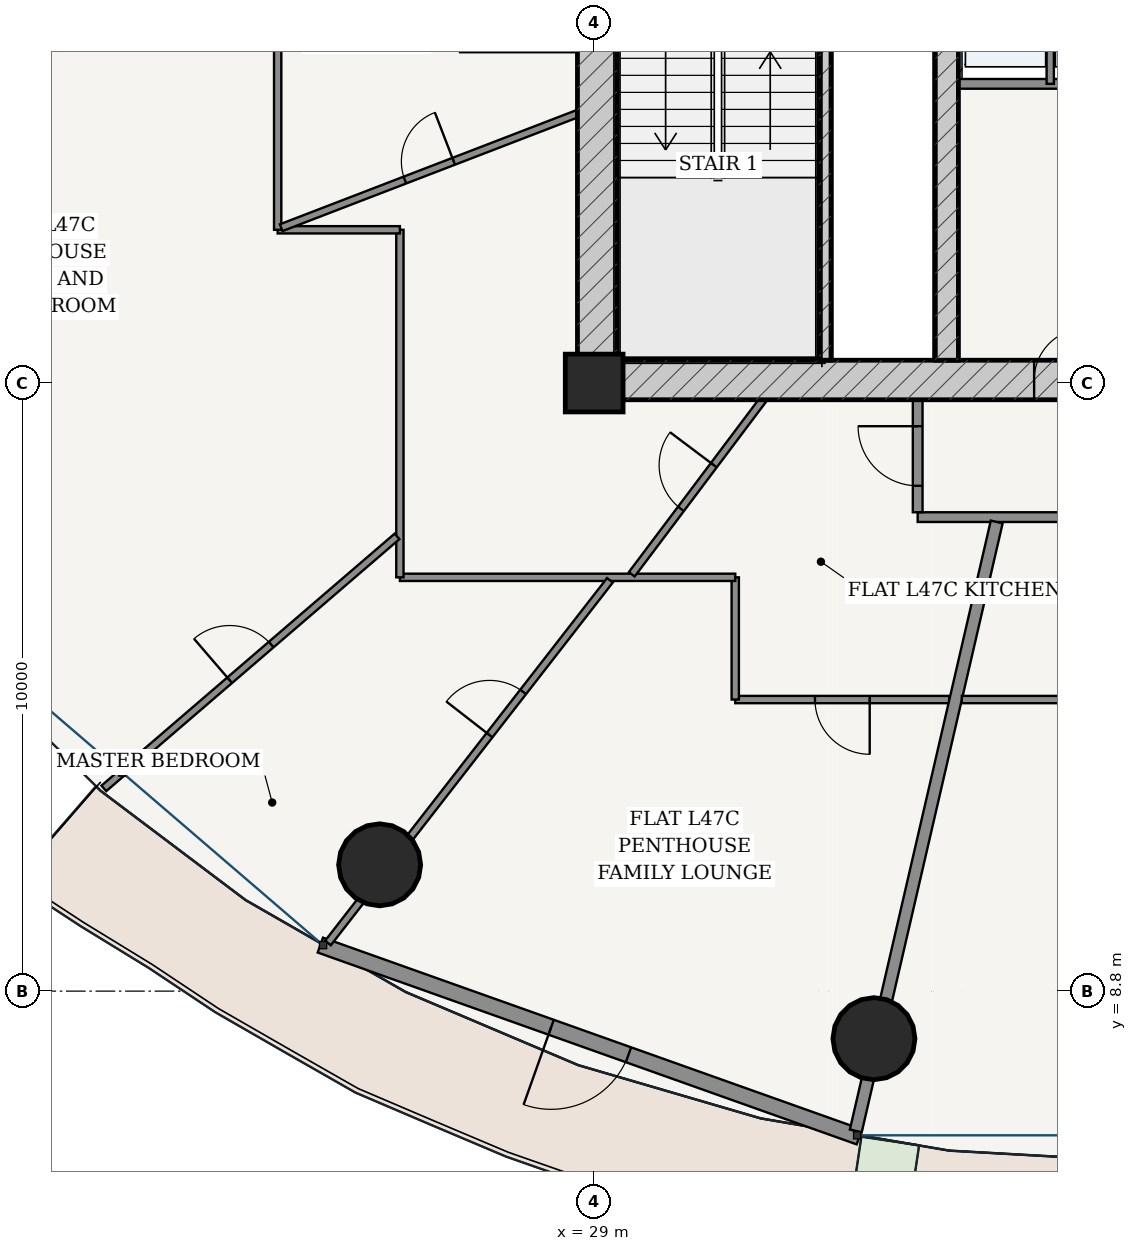
"""IFC4 building model, lengths in metres.
Left out: names, types, materials, properties, quantities, classifications, styles, units other than length and angle.
Written with IfcOpenShell. Run it as: python <this file> out.ifc"""

import sys

from ifc_helpers import new_model, si_unit, direction, frame, frame_2d, origin, origin_2d, place, context, subcontext, project, spatial, rectangle, hollow_circle, extrude, source, transform, mapped, element, fill, save


model = new_model("IFC4")
c1 = context("Model", 3, precision=1e-05, world=origin(), true_north=direction((-0.2419218956, 0.970295726276)))
c2 = subcontext(c1, "Body", "Model", "MODEL_VIEW")
j1 = project(units=[si_unit("LENGTHUNIT", "METRE"), si_unit("PLANEANGLEUNIT", "RADIAN")], contexts=[c1])
p1 = place(None, origin())
s1 = spatial("IfcSite", under=j1, at=p1, CompositionType="ELEMENT")
p2 = place(p1, origin())
s2 = spatial("IfcBuilding", under=s1, at=p2, CompositionType="ELEMENT")
p3 = place(p2, frame((0.0, 0.0, 178.6)))
s3 = spatial("IfcBuildingStorey", under=s2, at=p3, CompositionType="ELEMENT", Elevation=178.6)
p4 = place(p3, frame((29.0, 18.8, 0.0), z_axis=(0.0, 0.0, 1.0), x_axis=(1.0, 0.0, 0.0)))
e1 = element("IfcColumn", 1, at=p4, inside=s3, PredefinedType="COLUMN", context=c2, shape_type="SweptSolid", body=[
    extrude(rectangle(XDim=0.95, YDim=0.95, at=origin_2d()), origin(), (0.0, 0.0, 1.0), 3.6),
])
p5 = place(p3, frame((28.725, 18.85, 0.0), z_axis=(0.0, 0.0, 1.0), x_axis=(1.0, 0.0, 0.0)))
e2 = element("IfcWall", 2, at=p5, inside=s3, PredefinedType="SHEAR", context=c2, shape_type="SweptSolid", body=[
    extrude(rectangle(XDim=18.55, YDim=0.65, at=frame_2d((9.275, 0.0))), origin(), (0.0, 0.0, 1.0), 3.33),
])
p6 = place(p5, frame((7.51, 0.0, 0.0)))
e3 = element("IfcOpeningElement", 3, at=p6, cuts=e2, PredefinedType="OPENING", context=c2, shape_type="SweptSolid", body=[
    extrude(rectangle(XDim=0.85, YDim=2.1, at=frame_2d((0.425, 1.05))), frame((0.0, 0.335, 0.0), z_axis=(0.0, -1.0, 0.0), x_axis=(1.0, 0.0, 0.0)), (0.0, 0.0, 1.0), 0.67),
])
p7 = place(p5, frame((10.59, 0.0, 0.0)))
e4 = element("IfcOpeningElement", 4, at=p7, cuts=e2, PredefinedType="OPENING", context=c2, shape_type="SweptSolid", body=[
    extrude(rectangle(XDim=0.85, YDim=2.1, at=frame_2d((0.425, 1.05))), frame((0.0, 0.335, 0.0), z_axis=(0.0, -1.0, 0.0), x_axis=(1.0, 0.0, 0.0)), (0.0, 0.0, 1.0), 0.67),
])
p8 = place(p3, frame((29.05, 19.175, 0.0), z_axis=(0.0, 0.0, 1.0), x_axis=(0.0, 1.0, 0.0)))
e5 = element("IfcWall", 5, at=p8, inside=s3, PredefinedType="SHEAR", context=c2, shape_type="SweptSolid", body=[
    extrude(rectangle(XDim=15.25, YDim=0.65, at=frame_2d((7.625, 0.0))), origin(), (0.0, 0.0, 1.0), 3.33),
])
p9 = place(p8, frame((9.875, 0.0, 0.0)))
e6 = element("IfcOpeningElement", 6, at=p9, cuts=e5, PredefinedType="OPENING", context=c2, shape_type="SweptSolid", body=[
    extrude(rectangle(XDim=1.5, YDim=2.2, at=frame_2d((0.75, 1.1))), frame((0.0, 0.335, 0.0), z_axis=(0.0, -1.0, 0.0), x_axis=(1.0, 0.0, 0.0)), (0.0, 0.0, 1.0), 0.67),
])
p10 = place(p3, frame((32.795, 19.175, 0.0), z_axis=(0.0, 0.0, 1.0), x_axis=(0.0, 1.0, 0.0)))
e7 = element("IfcWall", 7, at=p10, inside=s3, PredefinedType="SOLIDWALL", context=c2, shape_type="SweptSolid", body=[
    extrude(rectangle(XDim=7.375, YDim=0.2, at=frame_2d((3.688, 0.0))), origin(), (0.0, 0.0, 1.0), 3.33),
])
p11 = place(p3, frame((34.8, 19.175, 0.0), z_axis=(0.0, 0.0, 1.0), x_axis=(0.0, 1.0, 0.0)))
e8 = element("IfcWall", 8, at=p11, inside=s3, PredefinedType="SHEAR", context=c2, shape_type="SweptSolid", body=[
    extrude(rectangle(XDim=15.25, YDim=0.38, at=frame_2d((7.625, 0.0))), origin(), (0.0, 0.0, 1.0), 3.33),
])
p12 = place(p11, frame((7.8, 0.0, 0.0)))
e9 = element("IfcOpeningElement", 9, at=p12, cuts=e8, PredefinedType="OPENING", context=c2, shape_type="SweptSolid", body=[
    extrude(rectangle(XDim=1.05, YDim=2.15, at=frame_2d((0.525, 1.075))), frame((0.0, 0.2, 0.0), z_axis=(0.0, -1.0, 0.0), x_axis=(1.0, 0.0, 0.0)), (0.0, 0.0, 1.0), 0.4),
])
for number, where, z_axis, x_axis in (
    (10, (25.472, 10.877, 0.0), (0.0, 0.0, 1.0), (1.0, 0.0, 0.0)),
    (11, (33.601, 8.018, 0.0), (0.0, 0.0, 1.0), (1.0, 0.0, 0.0)),
):
    element("IfcColumn", number, at=place(p3, frame(where, z_axis=z_axis, x_axis=x_axis)), inside=s3, PredefinedType="COLUMN", context=c2, shape_type="SweptSolid", body=[
        extrude(hollow_circle(Radius=0.675, WallThickness=0.042, at=origin_2d()), origin(), (0.0, 0.0, 1.0), 3.6),
    ])
p13 = place(p3, frame((24.497, 9.557, 0.0), z_axis=(0.0, 0.0, 1.0), x_axis=(0.942103604331, -0.335321932934, 0.0)))
e12 = element("IfcWall", 12, at=p13, inside=s3, PredefinedType="SOLIDWALL", context=c2, shape_type="SweptSolid", body=[
    extrude(rectangle(XDim=9.408, YDim=0.26, at=frame_2d((4.704, 0.0))), origin(), (0.0, 0.0, 1.0), 3.33),
])
p14 = place(p13, frame((4.029, 0.0, 0.0)))
e13 = element("IfcOpeningElement", 13, at=p14, cuts=e12, PredefinedType="OPENING", context=c2, shape_type="SweptSolid", body=[
    extrude(rectangle(XDim=1.35, YDim=2.2, at=frame_2d((0.675, 1.1))), frame((0.0, 0.14, 0.0), z_axis=(0.0, -1.0, 0.0), x_axis=(1.0, 0.0, 0.0)), (0.0, 0.0, 1.0), 0.28),
])
p15 = place(p3, frame((34.99, 23.72, 0.0), z_axis=(0.0, 0.0, 1.0), x_axis=(1.0, 0.0, 0.0)))
e14 = element("IfcWall", 14, at=p15, inside=s3, PredefinedType="PARTITIONING", context=c2, shape_type="SweptSolid", body=[
    extrude(rectangle(XDim=6.02, YDim=0.16, at=frame_2d((3.01, 0.0))), origin(), (0.0, 0.0, 1.0), 3.33),
])
p16 = place(p3, frame((36.5, 23.72, 0.0), z_axis=(0.0, 0.0, 1.0), x_axis=(0.0, 1.0, 0.0)))
e15 = element("IfcWall", 15, at=p16, inside=s3, PredefinedType="PARTITIONING", context=c2, shape_type="SweptSolid", body=[
    extrude(rectangle(XDim=2.56, YDim=0.12, at=frame_2d((1.28, 0.0))), origin(), (0.0, 0.0, 1.0), 3.33),
])
p17 = place(p3, frame((34.32, 16.595, 0.0), z_axis=(0.0, 0.0, 1.0), x_axis=(1.0, 0.0, 0.0)))
e16 = element("IfcWall", 16, at=p17, inside=s3, PredefinedType="PARTITIONING", context=c2, shape_type="SweptSolid", body=[
    extrude(rectangle(XDim=14.885, YDim=0.16, at=frame_2d((7.442, 0.0))), origin(), (0.0, 0.0, 1.0), 2.776),
])
p18 = place(p17, frame((10.026, 0.0, 0.0)))
e17 = element("IfcOpeningElement", 17, at=p18, cuts=e16, PredefinedType="OPENING", context=c2, shape_type="SweptSolid", body=[
    extrude(rectangle(XDim=0.98, YDim=2.2, at=frame_2d((0.49, 1.1))), frame((0.0, 0.09, 0.0), z_axis=(0.0, -1.0, 0.0), x_axis=(1.0, 0.0, 0.0)), (0.0, 0.0, 1.0), 0.18),
])
p19 = place(p3, frame((34.32, 16.675, 0.0), z_axis=(0.0, 0.0, 1.0), x_axis=(0.0, 1.0, 0.0)))
e18 = element("IfcWall", 18, at=p19, inside=s3, PredefinedType="PARTITIONING", context=c2, shape_type="SweptSolid", body=[
    extrude(rectangle(XDim=1.85, YDim=0.16, at=frame_2d((0.925, 0.0))), origin(), (0.0, 0.0, 1.0), 3.33),
])
p20 = place(p19, frame((0.435, 0.0, 0.0)))
e19 = element("IfcOpeningElement", 19, at=p20, cuts=e18, PredefinedType="OPENING", context=c2, shape_type="SweptSolid", body=[
    extrude(rectangle(XDim=0.98, YDim=2.2, at=frame_2d((0.49, 1.1))), frame((0.0, 0.09, 0.0), z_axis=(0.0, -1.0, 0.0), x_axis=(1.0, 0.0, 0.0)), (0.0, 0.0, 1.0), 0.18),
])
p21 = place(p3, frame((34.842, 13.595, 0.0), z_axis=(0.0, 0.0, 1.0), x_axis=(-1.0, 0.0, 0.0)))
e20 = element("IfcWall", 20, at=p21, inside=s3, PredefinedType="PARTITIONING", context=c2, shape_type="SweptSolid", body=[
    extrude(rectangle(XDim=3.522, YDim=0.12, at=frame_2d((1.761, 0.0))), origin(), (0.0, 0.0, 1.0), 2.776),
])
p22 = place(p21, frame((1.311, 0.0, 0.0)))
e21 = element("IfcOpeningElement", 21, at=p22, cuts=e20, PredefinedType="OPENING", context=c2, shape_type="SweptSolid", body=[
    extrude(rectangle(XDim=0.9, YDim=2.15, at=frame_2d((0.45, 1.075))), frame((0.0, 0.07, 0.0), z_axis=(0.0, -1.0, 0.0), x_axis=(1.0, 0.0, 0.0)), (0.0, 0.0, 1.0), 0.14),
])
p23 = place(p3, frame((31.32, 13.595, 0.0), z_axis=(0.0, 0.0, 1.0), x_axis=(0.0, 1.0, 0.0)))
e22 = element("IfcWall", 22, at=p23, inside=s3, PredefinedType="PARTITIONING", context=c2, shape_type="SweptSolid", body=[
    extrude(rectangle(XDim=2.01, YDim=0.12, at=frame_2d((1.005, 0.0))), origin(), (0.0, 0.0, 1.0), 3.005),
])
p24 = place(p3, frame((31.32, 15.605, 0.0), z_axis=(0.0, 0.0, 1.0), x_axis=(-1.0, 0.0, 0.0)))
e23 = element("IfcWall", 23, at=p24, inside=s3, PredefinedType="PARTITIONING", context=c2, shape_type="SweptSolid", body=[
    extrude(rectangle(XDim=5.515, YDim=0.12, at=frame_2d((2.758, 0.0))), origin(), (0.0, 0.0, 1.0), 2.776),
])
p25 = place(p3, frame((25.805, 15.605, 0.0), z_axis=(0.0, 0.0, 1.0), x_axis=(0.0, 1.0, 0.0)))
e24 = element("IfcWall", 24, at=p25, inside=s3, PredefinedType="PARTITIONING", context=c2, shape_type="SweptSolid", body=[
    extrude(rectangle(XDim=5.715, YDim=0.12, at=frame_2d((2.857, 0.0))), origin(), (0.0, 0.0, 1.0), 2.776),
])
p26 = place(p3, frame((25.805, 21.32, 0.0), z_axis=(0.0, 0.0, 1.0), x_axis=(-1.0, 0.0, 0.0)))
e25 = element("IfcWall", 25, at=p26, inside=s3, PredefinedType="PARTITIONING", context=c2, shape_type="SweptSolid", body=[
    extrude(rectangle(XDim=2.01, YDim=0.12, at=frame_2d((1.005, 0.0))), origin(), (0.0, 0.0, 1.0), 3.33),
])
p27 = place(p3, frame((23.795, 21.32, 0.0), z_axis=(0.0, 0.0, 1.0), x_axis=(0.0, 1.0, 0.0)))
e26 = element("IfcWall", 26, at=p27, inside=s3, PredefinedType="PARTITIONING", context=c2, shape_type="SweptSolid", body=[
    extrude(rectangle(XDim=5.378, YDim=0.12, at=frame_2d((2.689, 0.0))), origin(), (0.0, 0.0, 1.0), 2.776),
])
p28 = place(p3, frame((25.758, 16.278, 0.0), z_axis=(0.0, 0.0, 1.0), x_axis=(-0.758374994665, -0.651818508073, 0.0)))
e27 = element("IfcWall", 27, at=p28, inside=s3, PredefinedType="PARTITIONING", context=c2, shape_type="SweptSolid", body=[
    extrude(rectangle(XDim=6.358, YDim=0.12, at=frame_2d((3.179, 0.0))), origin(), (0.0, 0.0, 1.0), 2.846),
])
p29 = place(p28, frame((2.729, 0.0, 0.0)))
e28 = element("IfcOpeningElement", 28, at=p29, cuts=e27, PredefinedType="OPENING", context=c2, shape_type="SweptSolid", body=[
    extrude(rectangle(XDim=0.9, YDim=2.15, at=frame_2d((0.45, 1.075))), frame((0.0, 0.07, 0.0), z_axis=(0.0, -1.0, 0.0), x_axis=(1.0, 0.0, 0.0)), (0.0, 0.0, 1.0), 0.14),
])
p30 = place(p3, frame((29.259, 15.556, 0.0), z_axis=(0.0, 0.0, 1.0), x_axis=(-0.61375493029, -0.789496602617, 0.0)))
e29 = element("IfcWall", 29, at=p30, inside=s3, PredefinedType="PARTITIONING", context=c2, shape_type="SweptSolid", body=[
    extrude(rectangle(XDim=7.556, YDim=0.12, at=frame_2d((3.778, 0.0))), origin(), (0.0, 0.0, 1.0), 2.776),
])
p31 = place(p30, frame((2.325, 0.0, 0.0)))
e30 = element("IfcOpeningElement", 30, at=p31, cuts=e29, PredefinedType="OPENING", context=c2, shape_type="SweptSolid", body=[
    extrude(rectangle(XDim=0.9, YDim=2.15, at=frame_2d((0.45, 1.075))), frame((0.0, 0.07, 0.0), z_axis=(0.0, -1.0, 0.0), x_axis=(1.0, 0.0, 0.0)), (0.0, 0.0, 1.0), 0.14),
])
p32 = place(p3, frame((28.723, 23.229, 0.0), z_axis=(0.0, 0.0, 1.0), x_axis=(-0.933262385607, -0.359195378048, 0.0)))
e31 = element("IfcWall", 31, at=p32, inside=s3, PredefinedType="PARTITIONING", context=c2, shape_type="SweptSolid", body=[
    extrude(rectangle(XDim=5.219, YDim=0.12, at=frame_2d((2.609, 0.0))), origin(), (0.0, 0.0, 1.0), 3.33),
])
p33 = place(p32, frame((2.179, 0.0, 0.0)))
e32 = element("IfcOpeningElement", 32, at=p33, cuts=e31, PredefinedType="OPENING", context=c2, shape_type="SweptSolid", body=[
    extrude(rectangle(XDim=0.86, YDim=2.15, at=frame_2d((0.43, 1.075))), frame((0.0, 0.07, 0.0), z_axis=(0.0, -1.0, 0.0), x_axis=(1.0, 0.0, 0.0)), (0.0, 0.0, 1.0), 0.14),
])
p34 = place(p3, frame((31.777, 18.525, 0.0), z_axis=(0.0, 0.0, 1.0), x_axis=(-0.601054484551, -0.799208049635, 0.0)))
e33 = element("IfcWall", 33, at=p34, inside=s3, PredefinedType="PARTITIONING", context=c2, shape_type="SweptSolid", body=[
    extrude(rectangle(XDim=3.592, YDim=0.12, at=frame_2d((1.796, 0.0))), origin(), (0.0, 0.0, 1.0), 3.33),
])
p35 = place(p34, frame((1.346, 0.0, 0.0)))
e34 = element("IfcOpeningElement", 34, at=p35, cuts=e33, PredefinedType="OPENING", context=c2, shape_type="SweptSolid", body=[
    extrude(rectangle(XDim=0.9, YDim=2.15, at=frame_2d((0.45, 1.075))), frame((0.0, 0.07, 0.0), z_axis=(0.0, -1.0, 0.0), x_axis=(1.0, 0.0, 0.0)), (0.0, 0.0, 1.0), 0.14),
])
p36 = place(p3, frame((35.62, 16.515, 0.0), z_axis=(0.0, 0.0, 1.0), x_axis=(-0.225473598067, -0.974249278457, 0.0)))
e35 = element("IfcWall", 35, at=p36, inside=s3, PredefinedType="PARTITIONING", context=c2, shape_type="SweptSolid", body=[
    extrude(rectangle(XDim=10.278, YDim=0.2, at=frame_2d((5.139, 0.0))), origin(), (0.0, 0.0, 1.0), 2.776),
])
p37 = place(p3, frame((52.205, 13.595, 0.0), z_axis=(0.0, 0.0, 1.0), x_axis=(-1.0, 0.0, 0.0)))
e36 = element("IfcWall", 36, at=p37, inside=s3, PredefinedType="PARTITIONING", context=c2, shape_type="SweptSolid", body=[
    extrude(rectangle(XDim=17.159, YDim=0.12, at=frame_2d((8.58, 0.0))), origin(), (0.0, 0.0, 1.0), 2.776),
])
p38 = place(p37, frame((6.879, 0.0, 0.0)))
e37 = element("IfcOpeningElement", 37, at=p38, cuts=e36, PredefinedType="OPENING", context=c2, shape_type="SweptSolid", body=[
    extrude(rectangle(XDim=0.9, YDim=2.15, at=frame_2d((0.45, 1.075))), frame((0.0, 0.07, 0.0), z_axis=(0.0, -1.0, 0.0), x_axis=(1.0, 0.0, 0.0)), (0.0, 0.0, 1.0), 0.14),
])
p39 = place(p37, frame((1.64, 0.0, 0.0)))
e38 = element("IfcOpeningElement", 38, at=p39, cuts=e36, PredefinedType="OPENING", context=c2, shape_type="SweptSolid", body=[
    extrude(rectangle(XDim=0.9, YDim=2.15, at=frame_2d((0.45, 1.075))), frame((0.0, 0.07, 0.0), z_axis=(0.0, -1.0, 0.0), x_axis=(1.0, 0.0, 0.0)), (0.0, 0.0, 1.0), 0.14),
])
m1 = source(origin(), c2, "Body", "SweptSolid", [
    extrude(rectangle(XDim=1.35, YDim=2.2, at=frame_2d((0.675, 1.1))), frame((0.0, 0.025, 0.0), z_axis=(0.0, -1.0, 0.0), x_axis=(1.0, 0.0, 0.0)), (0.0, 0.0, 1.0), 0.05),
])
p40 = place(p14, frame((1.35, 0.0, 0.0), z_axis=(0.0, 0.0, 1.0), x_axis=(-1.0, 0.0, 0.0)))
e39 = element("IfcDoor", 39, at=p40, inside=s3, OperationType="SINGLE_SWING_RIGHT", PredefinedType="DOOR", context=c2, shape_type="MappedRepresentation", body=[
    mapped(m1, transform((0.0, 0.0, 0.0), scale=1.0)),
])
fill(e13, e39)
m2 = source(origin(), c2, "Body", "SweptSolid", [
    extrude(rectangle(XDim=0.85, YDim=2.1, at=frame_2d((0.425, 1.05))), frame((0.0, 0.025, 0.0), z_axis=(0.0, -1.0, 0.0), x_axis=(1.0, 0.0, 0.0)), (0.0, 0.0, 1.0), 0.05),
])
p41 = place(p6, origin())
e40 = element("IfcDoor", 40, at=p41, inside=s3, OperationType="SINGLE_SWING_RIGHT", PredefinedType="DOOR", context=c2, shape_type="MappedRepresentation", body=[
    mapped(m2, transform((0.0, 0.0, 0.0), scale=1.0)),
])
fill(e3, e40)
m3 = source(origin(), c2, "Body", "SweptSolid", [
    extrude(rectangle(XDim=0.98, YDim=2.2, at=frame_2d((0.49, 1.1))), frame((0.0, 0.025, 0.0), z_axis=(0.0, -1.0, 0.0), x_axis=(1.0, 0.0, 0.0)), (0.0, 0.0, 1.0), 0.05),
])
p42 = place(p20, origin())
e41 = element("IfcDoor", 41, at=p42, inside=s3, OperationType="SINGLE_SWING_RIGHT", PredefinedType="DOOR", context=c2, shape_type="MappedRepresentation", body=[
    mapped(m3, transform((0.0, 0.0, 0.0), scale=1.0)),
])
fill(e19, e41)
m4 = source(origin(), c2, "Body", "SweptSolid", [
    extrude(rectangle(XDim=0.9, YDim=2.15, at=frame_2d((0.45, 1.075))), frame((0.0, 0.025, 0.0), z_axis=(0.0, -1.0, 0.0), x_axis=(1.0, 0.0, 0.0)), (0.0, 0.0, 1.0), 0.05),
])
p43 = place(p22, origin())
e42 = element("IfcDoor", 42, at=p43, inside=s3, OperationType="SINGLE_SWING_LEFT", PredefinedType="DOOR", context=c2, shape_type="MappedRepresentation", body=[
    mapped(m4, transform((0.0, 0.0, 0.0), scale=1.0)),
])
fill(e21, e42)
p44 = place(p35, frame((0.9, 0.0, 0.0), z_axis=(0.0, 0.0, 1.0), x_axis=(-1.0, 0.0, 0.0)))
e43 = element("IfcDoor", 43, at=p44, inside=s3, OperationType="SINGLE_SWING_RIGHT", PredefinedType="DOOR", context=c2, shape_type="MappedRepresentation", body=[
    mapped(m4, transform((0.0, 0.0, 0.0), scale=1.0)),
])
fill(e34, e43)
p45 = place(p31, frame((0.9, 0.0, 0.0), z_axis=(0.0, 0.0, 1.0), x_axis=(-1.0, 0.0, 0.0)))
e44 = element("IfcDoor", 44, at=p45, inside=s3, OperationType="SINGLE_SWING_LEFT", PredefinedType="DOOR", context=c2, shape_type="MappedRepresentation", body=[
    mapped(m4, transform((0.0, 0.0, 0.0), scale=1.0)),
])
fill(e30, e44)
m5 = source(origin(), c2, "Body", "SweptSolid", [
    extrude(rectangle(XDim=0.86, YDim=2.15, at=frame_2d((0.43, 1.075))), frame((0.0, 0.025, 0.0), z_axis=(0.0, -1.0, 0.0), x_axis=(1.0, 0.0, 0.0)), (0.0, 0.0, 1.0), 0.05),
])
p46 = place(p33, frame((0.86, 0.0, 0.0), z_axis=(0.0, 0.0, 1.0), x_axis=(-1.0, 0.0, 0.0)))
e45 = element("IfcDoor", 45, at=p46, inside=s3, OperationType="SINGLE_SWING_RIGHT", PredefinedType="DOOR", context=c2, shape_type="MappedRepresentation", body=[
    mapped(m5, transform((0.0, 0.0, 0.0), scale=1.0)),
])
fill(e32, e45)
p47 = place(p29, frame((0.9, 0.0, 0.0), z_axis=(0.0, 0.0, 1.0), x_axis=(-1.0, 0.0, 0.0)))
e46 = element("IfcDoor", 46, at=p47, inside=s3, OperationType="SINGLE_SWING_LEFT", PredefinedType="DOOR", context=c2, shape_type="MappedRepresentation", body=[
    mapped(m4, transform((0.0, 0.0, 0.0), scale=1.0)),
])
fill(e28, e46)
save(model, sys.argv[1])
